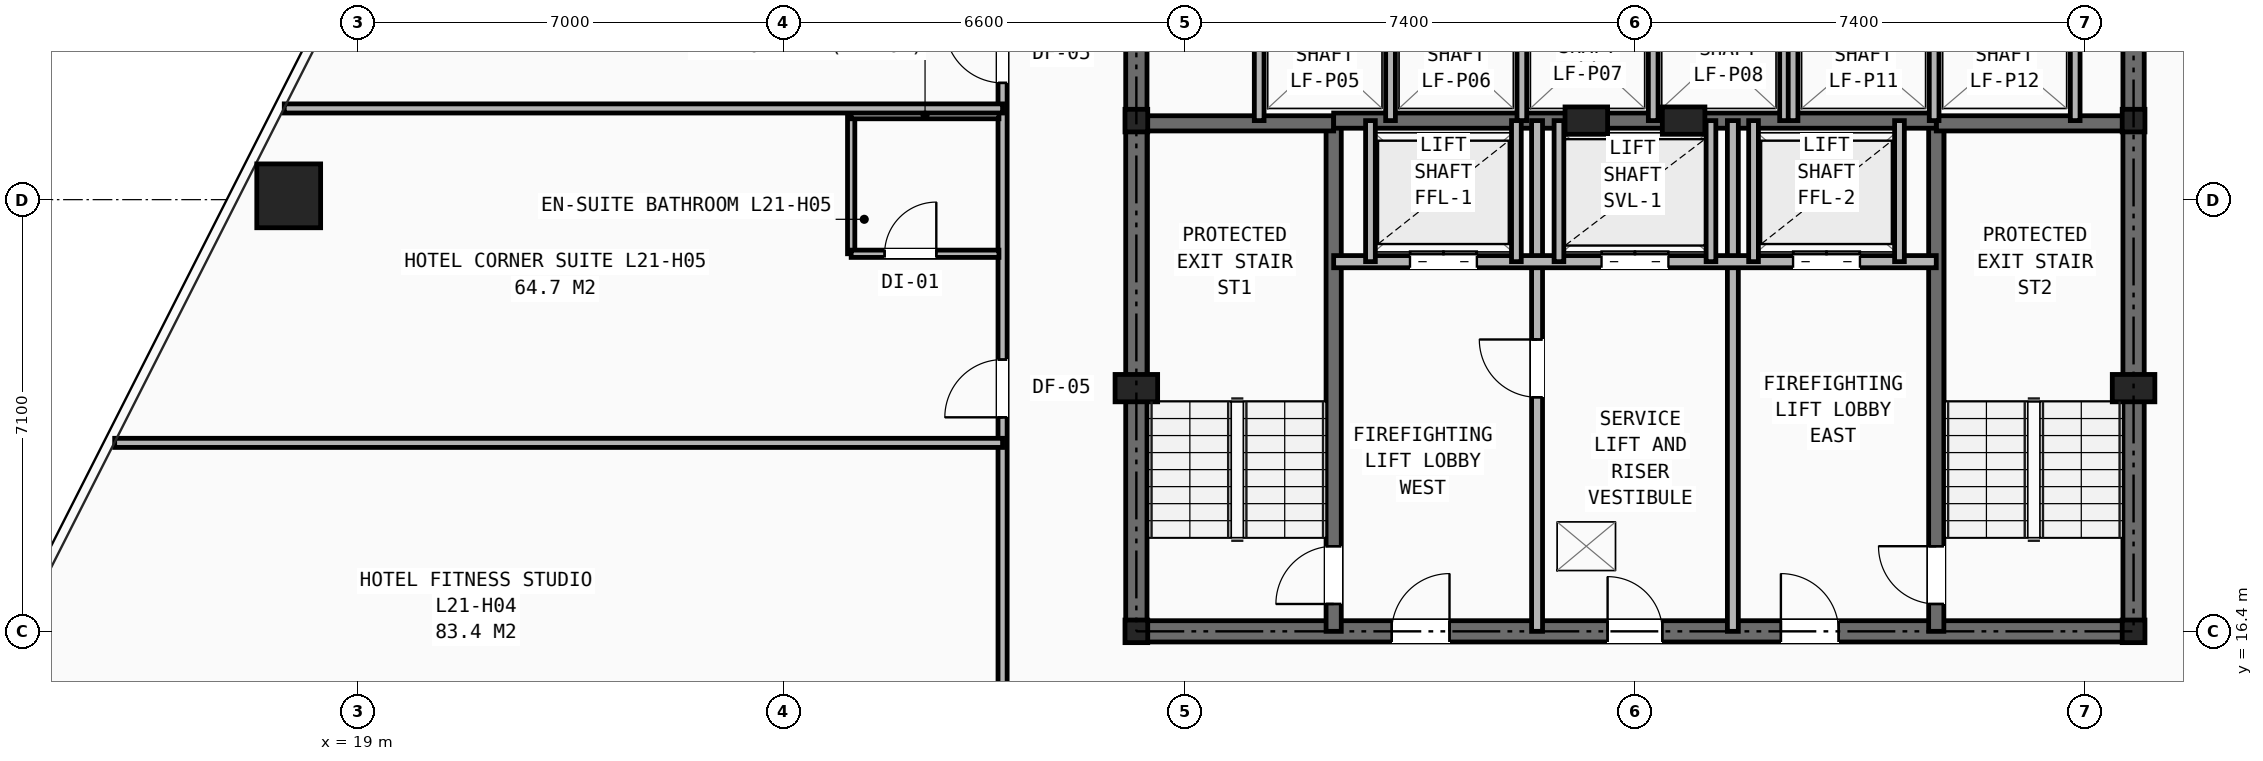
"""IFC4 building model, lengths in metres.
Left out: names, types, materials, properties, quantities, classifications, styles, units other than length and angle.
Written with IfcOpenShell. Run it as: python <this file> out.ifc"""

import sys

from ifc_helpers import new_model, si_unit, direction, frame, frame_2d, origin, origin_2d, place, context, subcontext, project, spatial, rectangle, hollow_rectangle, i_section, extrude, element, fill, save


model = new_model("IFC4")
c1 = context("Model", 3, precision=1e-05, world=origin(), true_north=direction((0.0, 1.0)))
c2 = subcontext(c1, "Body", "Model", "MODEL_VIEW")
j1 = project(units=[si_unit("LENGTHUNIT", "METRE"), si_unit("PLANEANGLEUNIT", "RADIAN")], contexts=[c1])
p1 = place(None, origin())
s1 = spatial("IfcSite", under=j1, at=p1, CompositionType="ELEMENT")
p2 = place(p1, origin())
s2 = spatial("IfcBuilding", under=s1, at=p2, CompositionType="ELEMENT")
p3 = place(p2, frame((0.0, 0.0, 76.6)))
s3 = spatial("IfcBuildingStorey", under=s2, at=p3, CompositionType="ELEMENT", Elevation=76.6)
for number, where, z_axis, x_axis in (
    (1, (31.8, 16.4, 0.0), (0.0, 0.0, 1.0), (1.0, 0.0, 0.0)),
    (2, (48.2, 16.4, 0.0), (0.0, 0.0, 1.0), (1.0, 0.0, 0.0)),
    (3, (31.8, 24.8, 0.0), (0.0, 0.0, 1.0), (1.0, 0.0, 0.0)),
    (4, (48.2, 24.8, 0.0), (0.0, 0.0, 1.0), (1.0, 0.0, 0.0)),
):
    element("IfcColumn", number, at=place(p3, frame(where, z_axis=z_axis, x_axis=x_axis)), inside=s3, PredefinedType="COLUMN", context=c2, shape_type="SweptSolid", body=[
        extrude(i_section(OverallWidth=0.374, OverallDepth=0.372, WebThickness=0.016, FlangeThickness=0.026, at=origin_2d()), origin(), (0.0, 0.0, 1.0), 3.2),
    ])
for number, where, z_axis, x_axis in (
    (5, (31.8, 20.4, 0.0), (0.0, 0.0, 1.0), (1.0, 0.0, 0.0)),
    (6, (48.2, 20.4, 0.0), (0.0, 0.0, 1.0), (1.0, 0.0, 0.0)),
    (7, (39.2, 24.8, 0.0), (0.0, 0.0, 1.0), (1.0, 0.0, 0.0)),
    (8, (40.8, 24.8, 0.0), (0.0, 0.0, 1.0), (1.0, 0.0, 0.0)),
):
    element("IfcColumn", number, at=place(p3, frame(where, z_axis=z_axis, x_axis=x_axis)), inside=s3, PredefinedType="PILASTER", context=c2, shape_type="SweptSolid", body=[
        extrude(rectangle(XDim=0.7, YDim=0.45, at=origin_2d()), origin(), (0.0, 0.0, 1.0), 3.2),
    ])
p4 = place(p3, frame((17.86, 23.563, 0.0), z_axis=(0.0, 0.0, 1.0), x_axis=(1.0, 0.0, 0.0)))
e9 = element("IfcColumn", 9, at=p4, inside=s3, PredefinedType="COLUMN", context=c2, shape_type="SweptSolid", body=[
    extrude(hollow_rectangle(XDim=1.05, YDim=1.05, WallThickness=0.07, at=origin_2d()), origin(), (0.0, 0.0, 1.0), 3.2),
])
p5 = place(p3, frame((31.8, 16.4, 0.0), z_axis=(0.0, 0.0, 1.0), x_axis=(1.0, 0.0, 0.0)))
e10 = element("IfcWall", 10, at=p5, inside=s3, PredefinedType="SHEAR", context=c2, shape_type="SweptSolid", body=[
    extrude(rectangle(XDim=16.4, YDim=0.35, at=frame_2d((8.2, 0.0))), origin(), (0.0, 0.0, 1.0), 2.97),
])
p6 = place(p5, frame((7.75, 0.0, 0.0)))
e11 = element("IfcOpeningElement", 11, at=p6, cuts=e10, PredefinedType="OPENING", context=c2, shape_type="SweptSolid", body=[
    extrude(rectangle(XDim=0.9, YDim=2.1, at=frame_2d((0.45, 1.05))), frame((0.0, 0.185, 0.0), z_axis=(0.0, -1.0, 0.0), x_axis=(1.0, 0.0, 0.0)), (0.0, 0.0, 1.0), 0.37),
])
p7 = place(p5, frame((4.2, 0.0, 0.0)))
e12 = element("IfcOpeningElement", 12, at=p7, cuts=e10, PredefinedType="OPENING", context=c2, shape_type="SweptSolid", body=[
    extrude(rectangle(XDim=0.95, YDim=2.1, at=frame_2d((0.475, 1.05))), frame((0.0, 0.185, 0.0), z_axis=(0.0, -1.0, 0.0), x_axis=(1.0, 0.0, 0.0)), (0.0, 0.0, 1.0), 0.37),
])
p8 = place(p5, frame((10.6, 0.0, 0.0)))
e13 = element("IfcOpeningElement", 13, at=p8, cuts=e10, PredefinedType="OPENING", context=c2, shape_type="SweptSolid", body=[
    extrude(rectangle(XDim=0.95, YDim=2.1, at=frame_2d((0.475, 1.05))), frame((0.0, 0.185, 0.0), z_axis=(0.0, -1.0, 0.0), x_axis=(1.0, 0.0, 0.0)), (0.0, 0.0, 1.0), 0.37),
])
p9 = place(p3, frame((31.8, 16.4, 0.0), z_axis=(0.0, 0.0, 1.0), x_axis=(0.0, 1.0, 0.0)))
e14 = element("IfcWall", 14, at=p9, inside=s3, PredefinedType="SHEAR", context=c2, shape_type="SweptSolid", body=[
    extrude(rectangle(XDim=14.8, YDim=0.35, at=frame_2d((7.4, 0.0))), origin(), (0.0, 0.0, 1.0), 2.97),
])
p10 = place(p9, frame((11.0, 0.0, 0.0)))
e15 = element("IfcOpeningElement", 15, at=p10, cuts=e14, PredefinedType="OPENING", context=c2, shape_type="SweptSolid", body=[
    extrude(rectangle(XDim=1.1, YDim=2.15, at=frame_2d((0.55, 1.075))), frame((0.0, 0.185, 0.0), z_axis=(0.0, -1.0, 0.0), x_axis=(1.0, 0.0, 0.0)), (0.0, 0.0, 1.0), 0.37),
])
p11 = place(p3, frame((48.2, 16.4, 0.0), z_axis=(0.0, 0.0, 1.0), x_axis=(0.0, 1.0, 0.0)))
e16 = element("IfcWall", 16, at=p11, inside=s3, PredefinedType="SHEAR", context=c2, shape_type="SweptSolid", body=[
    extrude(rectangle(XDim=14.8, YDim=0.35, at=frame_2d((7.4, 0.0))), origin(), (0.0, 0.0, 1.0), 2.97),
])
p12 = place(p11, frame((11.0, 0.0, 0.0)))
e17 = element("IfcOpeningElement", 17, at=p12, cuts=e16, PredefinedType="OPENING", context=c2, shape_type="SweptSolid", body=[
    extrude(rectangle(XDim=1.1, YDim=2.15, at=frame_2d((0.55, 1.075))), frame((0.0, 0.185, 0.0), z_axis=(0.0, -1.0, 0.0), x_axis=(1.0, 0.0, 0.0)), (0.0, 0.0, 1.0), 0.37),
])
p13 = place(p3, frame((35.045, 16.4, 0.0), z_axis=(0.0, 0.0, 1.0), x_axis=(0.0, 1.0, 0.0)))
e18 = element("IfcWall", 18, at=p13, inside=s3, PredefinedType="SHEAR", context=c2, shape_type="SweptSolid", body=[
    extrude(rectangle(XDim=8.4, YDim=0.25, at=frame_2d((4.2, 0.0))), origin(), (0.0, 0.0, 1.0), 2.97),
])
p14 = place(p13, frame((0.45, 0.0, 0.0)))
e19 = element("IfcOpeningElement", 19, at=p14, cuts=e18, PredefinedType="OPENING", context=c2, shape_type="SweptSolid", body=[
    extrude(rectangle(XDim=0.95, YDim=2.1, at=frame_2d((0.475, 1.05))), frame((0.0, 0.135, 0.0), z_axis=(0.0, -1.0, 0.0), x_axis=(1.0, 0.0, 0.0)), (0.0, 0.0, 1.0), 0.27),
])
p15 = place(p3, frame((31.8, 24.755, 0.0), z_axis=(0.0, 0.0, 1.0), x_axis=(1.0, 0.0, 0.0)))
e20 = element("IfcWall", 20, at=p15, inside=s3, PredefinedType="SHEAR", context=c2, shape_type="SweptSolid", body=[
    extrude(rectangle(XDim=3.245, YDim=0.25, at=frame_2d((1.623, 0.0))), origin(), (0.0, 0.0, 1.0), 2.97),
])
p16 = place(p3, frame((44.955, 16.4, 0.0), z_axis=(0.0, 0.0, 1.0), x_axis=(0.0, 1.0, 0.0)))
e21 = element("IfcWall", 21, at=p16, inside=s3, PredefinedType="SHEAR", context=c2, shape_type="SweptSolid", body=[
    extrude(rectangle(XDim=8.4, YDim=0.25, at=frame_2d((4.2, 0.0))), origin(), (0.0, 0.0, 1.0), 2.97),
])
p17 = place(p16, frame((0.45, 0.0, 0.0)))
e22 = element("IfcOpeningElement", 22, at=p17, cuts=e21, PredefinedType="OPENING", context=c2, shape_type="SweptSolid", body=[
    extrude(rectangle(XDim=0.95, YDim=2.1, at=frame_2d((0.475, 1.05))), frame((0.0, 0.135, 0.0), z_axis=(0.0, -1.0, 0.0), x_axis=(1.0, 0.0, 0.0)), (0.0, 0.0, 1.0), 0.27),
])
p18 = place(p3, frame((44.955, 24.755, 0.0), z_axis=(0.0, 0.0, 1.0), x_axis=(1.0, 0.0, 0.0)))
e23 = element("IfcWall", 23, at=p18, inside=s3, PredefinedType="SHEAR", context=c2, shape_type="SweptSolid", body=[
    extrude(rectangle(XDim=3.245, YDim=0.25, at=frame_2d((1.623, 0.0))), origin(), (0.0, 0.0, 1.0), 2.97),
])
p19 = place(p3, frame((35.045, 24.8, 0.0), z_axis=(0.0, 0.0, 1.0), x_axis=(1.0, 0.0, 0.0)))
e24 = element("IfcWall", 24, at=p19, inside=s3, PredefinedType="SHEAR", context=c2, shape_type="SweptSolid", body=[
    extrude(rectangle(XDim=9.91, YDim=0.25, at=frame_2d((4.955, 0.0))), origin(), (0.0, 0.0, 1.0), 2.97),
])
p20 = place(p3, frame((38.39, 16.4, 0.0), z_axis=(0.0, 0.0, 1.0), x_axis=(0.0, 1.0, 0.0)))
e25 = element("IfcWall", 25, at=p20, inside=s3, PredefinedType="PARTITIONING", context=c2, shape_type="SweptSolid", body=[
    extrude(rectangle(XDim=8.4, YDim=0.18, at=frame_2d((4.2, 0.0))), origin(), (0.0, 0.0, 1.0), 2.421),
])
p21 = place(p20, frame((3.85, 0.0, 0.0)))
e26 = element("IfcOpeningElement", 26, at=p21, cuts=e25, PredefinedType="OPENING", context=c2, shape_type="SweptSolid", body=[
    extrude(rectangle(XDim=0.95, YDim=2.1, at=frame_2d((0.475, 1.05))), frame((0.0, 0.1, 0.0), z_axis=(0.0, -1.0, 0.0), x_axis=(1.0, 0.0, 0.0)), (0.0, 0.0, 1.0), 0.2),
])
p22 = place(p3, frame((41.61, 16.4, 0.0), z_axis=(0.0, 0.0, 1.0), x_axis=(0.0, 1.0, 0.0)))
e27 = element("IfcWall", 27, at=p22, inside=s3, PredefinedType="PARTITIONING", context=c2, shape_type="SweptSolid", body=[
    extrude(rectangle(XDim=8.4, YDim=0.18, at=frame_2d((4.2, 0.0))), origin(), (0.0, 0.0, 1.0), 2.421),
])
p23 = place(p3, frame((35.045, 22.48, 0.0), z_axis=(0.0, 0.0, 1.0), x_axis=(1.0, 0.0, 0.0)))
e28 = element("IfcWall", 28, at=p23, inside=s3, PredefinedType="SOLIDWALL", context=c2, shape_type="SweptSolid", body=[
    extrude(rectangle(XDim=9.91, YDim=0.2, at=frame_2d((4.955, 0.0))), origin(), (0.0, 0.0, 1.0), 2.97),
])
p24 = place(p23, frame((1.255, 0.0, 0.0)))
e29 = element("IfcOpeningElement", 29, at=p24, cuts=e28, PredefinedType="OPENING", context=c2, shape_type="SweptSolid", body=[
    extrude(rectangle(XDim=1.1, YDim=2.15, at=frame_2d((0.55, 1.075))), frame((0.0, 0.11, 0.0), z_axis=(0.0, -1.0, 0.0), x_axis=(1.0, 0.0, 0.0)), (0.0, 0.0, 1.0), 0.22),
])
p25 = place(p23, frame((7.555, 0.0, 0.0)))
e30 = element("IfcOpeningElement", 30, at=p25, cuts=e28, PredefinedType="OPENING", context=c2, shape_type="SweptSolid", body=[
    extrude(rectangle(XDim=1.1, YDim=2.15, at=frame_2d((0.55, 1.075))), frame((0.0, 0.11, 0.0), z_axis=(0.0, -1.0, 0.0), x_axis=(1.0, 0.0, 0.0)), (0.0, 0.0, 1.0), 0.22),
])
p26 = place(p23, frame((4.405, 0.0, 0.0)))
e31 = element("IfcOpeningElement", 31, at=p26, cuts=e28, PredefinedType="OPENING", context=c2, shape_type="SweptSolid", body=[
    extrude(rectangle(XDim=1.1, YDim=2.15, at=frame_2d((0.55, 1.075))), frame((0.0, 0.11, 0.0), z_axis=(0.0, -1.0, 0.0), x_axis=(1.0, 0.0, 0.0)), (0.0, 0.0, 1.0), 0.22),
])
for number, where, z_axis, x_axis in (
    (32, (35.65, 22.48, 0.0), (0.0, 0.0, 1.0), (0.0, 1.0, 0.0)),
    (33, (38.05, 22.48, 0.0), (0.0, 0.0, 1.0), (0.0, 1.0, 0.0)),
    (34, (41.95, 22.48, 0.0), (0.0, 0.0, 1.0), (0.0, 1.0, 0.0)),
    (35, (44.35, 22.48, 0.0), (0.0, 0.0, 1.0), (0.0, 1.0, 0.0)),
    (36, (38.75, 22.48, 0.0), (0.0, 0.0, 1.0), (0.0, 1.0, 0.0)),
    (37, (41.25, 22.48, 0.0), (0.0, 0.0, 1.0), (0.0, 1.0, 0.0)),
):
    element("IfcWall", number, at=place(p3, frame(where, z_axis=z_axis, x_axis=x_axis)), inside=s3, PredefinedType="SOLIDWALL", context=c2, shape_type="SweptSolid", body=[
        extrude(rectangle(XDim=2.32, YDim=0.16, at=frame_2d((1.16, 0.0))), origin(), (0.0, 0.0, 1.0), 2.97),
    ])
for number, where, z_axis, x_axis in (
    (38, (33.82, 24.8, 0.0), (0.0, 0.0, 1.0), (0.0, 1.0, 0.0)),
    (39, (35.98, 24.8, 0.0), (0.0, 0.0, 1.0), (0.0, 1.0, 0.0)),
    (40, (38.14, 24.8, 0.0), (0.0, 0.0, 1.0), (0.0, 1.0, 0.0)),
    (41, (40.3, 24.8, 0.0), (0.0, 0.0, 1.0), (0.0, 1.0, 0.0)),
    (42, (42.46, 24.8, 0.0), (0.0, 0.0, 1.0), (0.0, 1.0, 0.0)),
    (43, (42.6, 24.8, 0.0), (0.0, 0.0, 1.0), (0.0, 1.0, 0.0)),
    (44, (44.92, 24.8, 0.0), (0.0, 0.0, 1.0), (0.0, 1.0, 0.0)),
    (45, (47.24, 24.8, 0.0), (0.0, 0.0, 1.0), (0.0, 1.0, 0.0)),
):
    element("IfcWall", number, at=place(p3, frame(where, z_axis=z_axis, x_axis=x_axis)), inside=s3, PredefinedType="SOLIDWALL", context=c2, shape_type="SweptSolid", body=[
        extrude(rectangle(XDim=2.08, YDim=0.16, at=frame_2d((1.04, 0.0))), origin(), (0.0, 0.0, 1.0), 2.97),
    ])
p27 = place(p3, frame((29.6, 14.1, 0.0), z_axis=(0.0, 0.0, 1.0), x_axis=(0.0, 1.0, 0.0)))
e46 = element("IfcWall", 46, at=p27, inside=s3, PredefinedType="PARTITIONING", context=c2, shape_type="SweptSolid", body=[
    extrude(rectangle(XDim=21.9, YDim=0.15, at=frame_2d((10.95, 0.0))), origin(), (0.0, 0.0, 1.0), 2.421),
])
p28 = place(p27, frame((0.42, 0.0, 0.0)))
e47 = element("IfcOpeningElement", 47, at=p28, cuts=e46, PredefinedType="OPENING", context=c2, shape_type="SweptSolid", body=[
    extrude(rectangle(XDim=0.95, YDim=2.1, at=frame_2d((0.475, 1.05))), frame((0.0, 0.085, 0.0), z_axis=(0.0, -1.0, 0.0), x_axis=(1.0, 0.0, 0.0)), (0.0, 0.0, 1.0), 0.17),
])
p29 = place(p27, frame((5.82, 0.0, 0.0)))
e48 = element("IfcOpeningElement", 48, at=p29, cuts=e46, PredefinedType="OPENING", context=c2, shape_type="SweptSolid", body=[
    extrude(rectangle(XDim=0.95, YDim=2.1, at=frame_2d((0.475, 1.05))), frame((0.0, 0.085, 0.0), z_axis=(0.0, -1.0, 0.0), x_axis=(1.0, 0.0, 0.0)), (0.0, 0.0, 1.0), 0.17),
])
p30 = place(p27, frame((11.32, 0.0, 0.0)))
e49 = element("IfcOpeningElement", 49, at=p30, cuts=e46, PredefinedType="OPENING", context=c2, shape_type="SweptSolid", body=[
    extrude(rectangle(XDim=0.95, YDim=2.1, at=frame_2d((0.475, 1.05))), frame((0.0, 0.085, 0.0), z_axis=(0.0, -1.0, 0.0), x_axis=(1.0, 0.0, 0.0)), (0.0, 0.0, 1.0), 0.17),
])
p31 = place(p27, frame((16.82, 0.0, 0.0)))
e50 = element("IfcOpeningElement", 50, at=p31, cuts=e46, PredefinedType="OPENING", context=c2, shape_type="SweptSolid", body=[
    extrude(rectangle(XDim=0.95, YDim=2.1, at=frame_2d((0.475, 1.05))), frame((0.0, 0.085, 0.0), z_axis=(0.0, -1.0, 0.0), x_axis=(1.0, 0.0, 0.0)), (0.0, 0.0, 1.0), 0.17),
])
p32 = place(p3, frame((14.998, 19.5, 0.0), z_axis=(0.0, 0.0, 1.0), x_axis=(1.0, 0.0, 0.0)))
e51 = element("IfcWall", 51, at=p32, inside=s3, PredefinedType="PARTITIONING", context=c2, shape_type="SweptSolid", body=[
    extrude(rectangle(XDim=14.602, YDim=0.15, at=frame_2d((7.301, 0.0))), origin(), (0.0, 0.0, 1.0), 2.258),
])
p33 = place(p3, frame((27.11, 22.61, 0.0), z_axis=(0.0, 0.0, 1.0), x_axis=(0.0, 1.0, 0.0)))
e52 = element("IfcWall", 52, at=p33, inside=s3, PredefinedType="PARTITIONING", context=c2, shape_type="SweptSolid", body=[
    extrude(rectangle(XDim=2.28, YDim=0.12, at=frame_2d((1.14, 0.0))), origin(), (0.0, 0.0, 1.0), 2.97),
])
p34 = place(p3, frame((27.11, 22.61, 0.0), z_axis=(0.0, 0.0, 1.0), x_axis=(1.0, 0.0, 0.0)))
e53 = element("IfcWall", 53, at=p34, inside=s3, PredefinedType="PARTITIONING", context=c2, shape_type="SweptSolid", body=[
    extrude(rectangle(XDim=2.43, YDim=0.12, at=frame_2d((1.215, 0.0))), origin(), (0.0, 0.0, 1.0), 2.97),
])
p35 = place(p34, frame((0.55, 0.0, 0.0)))
e54 = element("IfcOpeningElement", 54, at=p35, cuts=e53, PredefinedType="OPENING", context=c2, shape_type="SweptSolid", body=[
    extrude(rectangle(XDim=0.85, YDim=2.05, at=frame_2d((0.425, 1.025))), frame((0.0, 0.07, 0.0), z_axis=(0.0, -1.0, 0.0), x_axis=(1.0, 0.0, 0.0)), (0.0, 0.0, 1.0), 0.14),
])
p36 = place(p3, frame((27.11, 24.89, 0.0), z_axis=(0.0, 0.0, 1.0), x_axis=(1.0, 0.0, 0.0)))
e55 = element("IfcWall", 55, at=p36, inside=s3, PredefinedType="PARTITIONING", context=c2, shape_type="SweptSolid", body=[
    extrude(rectangle(XDim=2.43, YDim=0.12, at=frame_2d((1.215, 0.0))), origin(), (0.0, 0.0, 1.0), 2.97),
])
p37 = place(p3, frame((17.787, 25.0, 0.0), z_axis=(0.0, 0.0, 1.0), x_axis=(1.0, 0.0, 0.0)))
e56 = element("IfcWall", 56, at=p37, inside=s3, PredefinedType="PARTITIONING", context=c2, shape_type="SweptSolid", body=[
    extrude(rectangle(XDim=11.813, YDim=0.15, at=frame_2d((5.907, 0.0))), origin(), (0.0, 0.0, 1.0), 2.258),
])
p38 = place(p6, origin())
e57 = element("IfcDoor", 57, at=p38, inside=s3, OperationType="SINGLE_SWING_LEFT", PredefinedType="DOOR", context=c2, shape_type="SweptSolid", body=[
    extrude(rectangle(XDim=0.9, YDim=2.1, at=frame_2d((0.45, 1.05))), frame((0.0, 0.025, 0.0), z_axis=(0.0, -1.0, 0.0), x_axis=(1.0, 0.0, 0.0)), (0.0, 0.0, 1.0), 0.05),
])
fill(e11, e57)
p39 = place(p21, origin())
e58 = element("IfcDoor", 58, at=p39, inside=s3, OperationType="SINGLE_SWING_RIGHT", PredefinedType="DOOR", context=c2, shape_type="SweptSolid", body=[
    extrude(rectangle(XDim=0.95, YDim=2.1, at=frame_2d((0.475, 1.05))), frame((0.0, 0.025, 0.0), z_axis=(0.0, -1.0, 0.0), x_axis=(1.0, 0.0, 0.0)), (0.0, 0.0, 1.0), 0.05),
])
fill(e26, e58)
p40 = place(p14, origin())
e59 = element("IfcDoor", 59, at=p40, inside=s3, OperationType="SINGLE_SWING_LEFT", PredefinedType="DOOR", context=c2, shape_type="SweptSolid", body=[
    extrude(rectangle(XDim=0.95, YDim=2.1, at=frame_2d((0.475, 1.05))), frame((0.0, 0.025, 0.0), z_axis=(0.0, -1.0, 0.0), x_axis=(1.0, 0.0, 0.0)), (0.0, 0.0, 1.0), 0.05),
])
fill(e19, e59)
p41 = place(p17, origin())
e60 = element("IfcDoor", 60, at=p41, inside=s3, OperationType="SINGLE_SWING_RIGHT", PredefinedType="DOOR", context=c2, shape_type="SweptSolid", body=[
    extrude(rectangle(XDim=0.95, YDim=2.1, at=frame_2d((0.475, 1.05))), frame((0.0, 0.025, 0.0), z_axis=(0.0, -1.0, 0.0), x_axis=(1.0, 0.0, 0.0)), (0.0, 0.0, 1.0), 0.05),
])
fill(e22, e60)
p42 = place(p7, origin())
e61 = element("IfcDoor", 61, at=p42, inside=s3, OperationType="SINGLE_SWING_RIGHT", PredefinedType="DOOR", context=c2, shape_type="SweptSolid", body=[
    extrude(rectangle(XDim=0.95, YDim=2.1, at=frame_2d((0.475, 1.05))), frame((0.0, 0.025, 0.0), z_axis=(0.0, -1.0, 0.0), x_axis=(1.0, 0.0, 0.0)), (0.0, 0.0, 1.0), 0.05),
])
fill(e12, e61)
p43 = place(p8, origin())
e62 = element("IfcDoor", 62, at=p43, inside=s3, OperationType="SINGLE_SWING_LEFT", PredefinedType="DOOR", context=c2, shape_type="SweptSolid", body=[
    extrude(rectangle(XDim=0.95, YDim=2.1, at=frame_2d((0.475, 1.05))), frame((0.0, 0.025, 0.0), z_axis=(0.0, -1.0, 0.0), x_axis=(1.0, 0.0, 0.0)), (0.0, 0.0, 1.0), 0.05),
])
fill(e13, e62)
p44 = place(p24, origin())
e63 = element("IfcDoor", 63, at=p44, inside=s3, OperationType="DOUBLE_DOOR_SLIDING", PredefinedType="DOOR", context=c2, shape_type="SweptSolid", body=[
    extrude(rectangle(XDim=1.1, YDim=2.15, at=frame_2d((0.55, 1.075))), frame((0.0, 0.025, 0.0), z_axis=(0.0, -1.0, 0.0), x_axis=(1.0, 0.0, 0.0)), (0.0, 0.0, 1.0), 0.05),
])
fill(e29, e63)
p45 = place(p25, origin())
e64 = element("IfcDoor", 64, at=p45, inside=s3, OperationType="DOUBLE_DOOR_SLIDING", PredefinedType="DOOR", context=c2, shape_type="SweptSolid", body=[
    extrude(rectangle(XDim=1.1, YDim=2.15, at=frame_2d((0.55, 1.075))), frame((0.0, 0.025, 0.0), z_axis=(0.0, -1.0, 0.0), x_axis=(1.0, 0.0, 0.0)), (0.0, 0.0, 1.0), 0.05),
])
fill(e30, e64)
p46 = place(p26, origin())
e65 = element("IfcDoor", 65, at=p46, inside=s3, OperationType="DOUBLE_DOOR_SLIDING", PredefinedType="DOOR", context=c2, shape_type="SweptSolid", body=[
    extrude(rectangle(XDim=1.1, YDim=2.15, at=frame_2d((0.55, 1.075))), frame((0.0, 0.025, 0.0), z_axis=(0.0, -1.0, 0.0), x_axis=(1.0, 0.0, 0.0)), (0.0, 0.0, 1.0), 0.05),
])
fill(e31, e65)
p47 = place(p29, origin())
e66 = element("IfcDoor", 66, at=p47, inside=s3, OperationType="SINGLE_SWING_LEFT", PredefinedType="DOOR", context=c2, shape_type="SweptSolid", body=[
    extrude(rectangle(XDim=0.95, YDim=2.1, at=frame_2d((0.475, 1.05))), frame((0.0, 0.025, 0.0), z_axis=(0.0, -1.0, 0.0), x_axis=(1.0, 0.0, 0.0)), (0.0, 0.0, 1.0), 0.05),
])
fill(e48, e66)
p48 = place(p35, origin())
e67 = element("IfcDoor", 67, at=p48, inside=s3, OperationType="SINGLE_SWING_RIGHT", PredefinedType="DOOR", context=c2, shape_type="SweptSolid", body=[
    extrude(rectangle(XDim=0.85, YDim=2.05, at=frame_2d((0.425, 1.025))), frame((0.0, 0.025, 0.0), z_axis=(0.0, -1.0, 0.0), x_axis=(1.0, 0.0, 0.0)), (0.0, 0.0, 1.0), 0.05),
])
fill(e54, e67)
p49 = place(p30, origin())
e68 = element("IfcDoor", 68, at=p49, inside=s3, OperationType="SINGLE_SWING_RIGHT", PredefinedType="DOOR", context=c2, shape_type="SweptSolid", body=[
    extrude(rectangle(XDim=0.95, YDim=2.1, at=frame_2d((0.475, 1.05))), frame((0.0, 0.025, 0.0), z_axis=(0.0, -1.0, 0.0), x_axis=(1.0, 0.0, 0.0)), (0.0, 0.0, 1.0), 0.05),
])
fill(e49, e68)
save(model, sys.argv[1])
